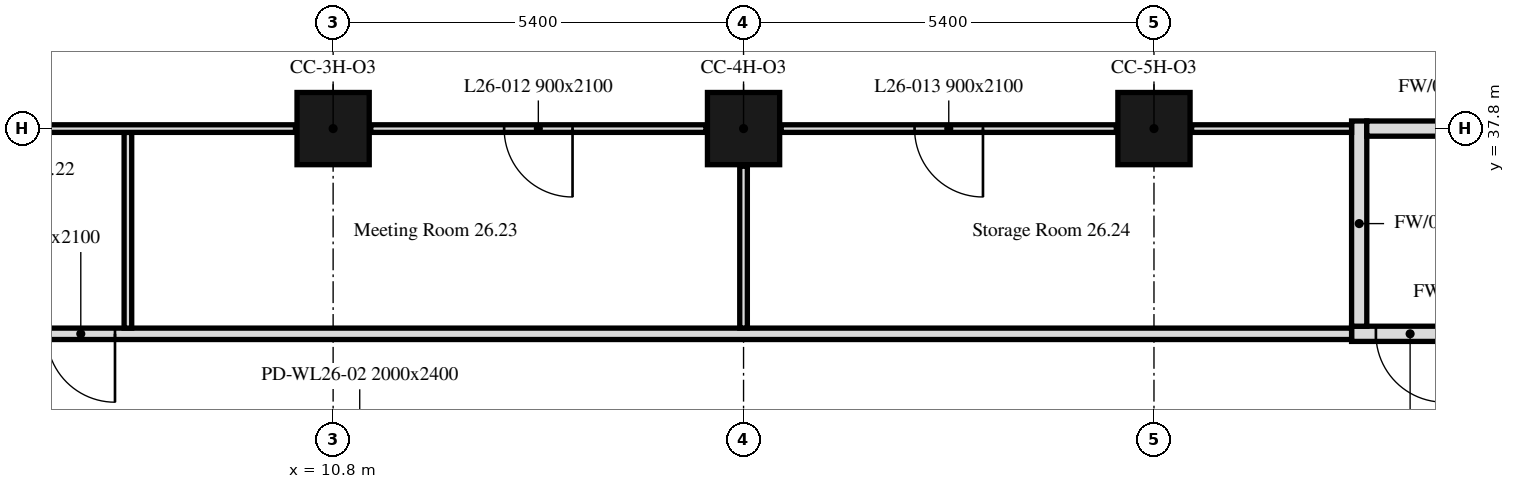
"""IFC4 building model, lengths in metres.
Left out: names, types, materials, properties, quantities, classifications, styles, units other than length and angle.
Written with IfcOpenShell. Run it as: python <this file> out.ifc"""

import sys

from ifc_helpers import new_model, si_unit, direction, frame, frame_2d, origin, origin_2d, place, context, subcontext, project, spatial, rectangle, extrude, element, fill, save


model = new_model("IFC4")
c1 = context("Model", 3, precision=1e-05, world=origin(), true_north=direction((0.0, 1.0)))
c2 = subcontext(c1, "Body", "Model", "MODEL_VIEW")
j1 = project(units=[si_unit("LENGTHUNIT", "METRE"), si_unit("PLANEANGLEUNIT", "RADIAN")], contexts=[c1])
p1 = place(None, origin())
s1 = spatial("IfcSite", under=j1, at=p1, CompositionType="ELEMENT")
p2 = place(p1, origin())
s2 = spatial("IfcBuilding", under=s1, at=p2, CompositionType="ELEMENT")
p3 = place(p2, frame((0.0, 0.0, 110.6)))
s3 = spatial("IfcBuildingStorey", under=s2, at=p3, CompositionType="ELEMENT", Elevation=110.6)
for number, where, z_axis, x_axis in (
    (1, (10.8, 37.8, 0.0), (0.0, 0.0, 1.0), (1.0, 0.0, 0.0)),
    (2, (16.2, 37.8, 0.0), (0.0, 0.0, 1.0), (1.0, 0.0, 0.0)),
    (3, (21.6, 37.8, 0.0), (0.0, 0.0, 1.0), (1.0, 0.0, 0.0)),
):
    element("IfcColumn", number, at=place(p3, frame(where, z_axis=z_axis, x_axis=x_axis)), inside=s3, PredefinedType="COLUMN", context=c2, shape_type="SweptSolid", body=[
        extrude(rectangle(XDim=0.95, YDim=0.95, at=origin_2d()), origin(), (0.0, 0.0, 1.0), 3.5),
    ])
p4 = place(p3, frame((27.1, 35.1, 0.0), z_axis=(0.0, 0.0, 1.0), x_axis=(-1.0, 0.0, 0.0)))
e4 = element("IfcWall", 4, at=p4, inside=s3, PredefinedType="PARTITIONING", context=c2, shape_type="SweptSolid", body=[
    extrude(rectangle(XDim=2.9, YDim=0.2, at=frame_2d((1.45, 0.0))), origin(), (0.0, 0.0, 1.0), 2.75),
])
p5 = place(p4, frame((1.68, 0.0, 0.0)))
e5 = element("IfcOpeningElement", 5, at=p5, cuts=e4, PredefinedType="OPENING", context=c2, shape_type="SweptSolid", body=[
    extrude(rectangle(XDim=0.9, YDim=2.1, at=frame_2d((0.45, 1.05))), frame((0.0, 0.1, 0.0), z_axis=(0.0, -1.0, 0.0), x_axis=(1.0, 0.0, 0.0)), (0.0, 0.0, 1.0), 0.2),
])
p6 = place(p3, frame((24.2, 35.1, 0.0), z_axis=(0.0, 0.0, 1.0), x_axis=(-1.0, 0.0, 0.0)))
e6 = element("IfcWall", 6, at=p6, inside=s3, PredefinedType="PARTITIONING", context=c2, shape_type="SweptSolid", body=[
    extrude(rectangle(XDim=23.449, YDim=0.15, at=frame_2d((11.725, 0.0))), origin(), (0.0, 0.0, 1.0), 2.75),
])
p7 = place(p6, frame((16.27, 0.0, 0.0)))
e7 = element("IfcOpeningElement", 7, at=p7, cuts=e6, PredefinedType="OPENING", context=c2, shape_type="SweptSolid", body=[
    extrude(rectangle(XDim=0.9, YDim=2.1, at=frame_2d((0.45, 1.05))), frame((0.0, 0.075, 0.0), z_axis=(0.0, -1.0, 0.0), x_axis=(1.0, 0.0, 0.0)), (0.0, 0.0, 1.0), 0.15),
])
p8 = place(p6, frame((20.375, 0.0, 0.0)))
e8 = element("IfcOpeningElement", 8, at=p8, cuts=e6, PredefinedType="OPENING", context=c2, shape_type="SweptSolid", body=[
    extrude(rectangle(XDim=0.9, YDim=2.1, at=frame_2d((0.45, 1.05))), frame((0.0, 0.075, 0.0), z_axis=(0.0, -1.0, 0.0), x_axis=(1.0, 0.0, 0.0)), (0.0, 0.0, 1.0), 0.15),
])
p9 = place(p3, frame((8.1, 35.175, 0.0), z_axis=(0.0, 0.0, 1.0), x_axis=(0.0, 1.0, 0.0)))
e9 = element("IfcWall", 9, at=p9, inside=s3, PredefinedType="PARTITIONING", context=c2, shape_type="SweptSolid", body=[
    extrude(rectangle(XDim=2.575, YDim=0.1, at=frame_2d((1.288, 0.0))), origin(), (0.0, 0.0, 1.0), 3.5),
])
p10 = place(p3, frame((16.2, 35.175, 0.0), z_axis=(0.0, 0.0, 1.0), x_axis=(0.0, 1.0, 0.0)))
e10 = element("IfcWall", 10, at=p10, inside=s3, PredefinedType="PARTITIONING", context=c2, shape_type="SweptSolid", body=[
    extrude(rectangle(XDim=2.13, YDim=0.1, at=frame_2d((1.065, 0.0))), origin(), (0.0, 0.0, 1.0), 2.75),
])
p11 = place(p3, frame((15.705, 37.8, 0.0), z_axis=(0.0, 0.0, 1.0), x_axis=(-1.0, 0.0, 0.0)))
e11 = element("IfcWall", 11, at=p11, inside=s3, PredefinedType="PARTITIONING", context=c2, shape_type="SweptSolid", body=[
    extrude(rectangle(XDim=4.41, YDim=0.1, at=frame_2d((2.205, 0.0))), origin(), (0.0, 0.0, 1.0), 2.75),
])
p12 = place(p11, frame((1.755, 0.0, 0.0)))
e12 = element("IfcOpeningElement", 12, at=p12, cuts=e11, PredefinedType="OPENING", context=c2, shape_type="SweptSolid", body=[
    extrude(rectangle(XDim=0.9, YDim=2.1, at=frame_2d((0.45, 1.05))), frame((0.0, 0.05, 0.0), z_axis=(0.0, -1.0, 0.0), x_axis=(1.0, 0.0, 0.0)), (0.0, 0.0, 1.0), 0.1),
])
p13 = place(p3, frame((10.305, 37.8, 0.0), z_axis=(0.0, 0.0, 1.0), x_axis=(-1.0, 0.0, 0.0)))
e13 = element("IfcWall", 13, at=p13, inside=s3, PredefinedType="PARTITIONING", context=c2, shape_type="SweptSolid", body=[
    extrude(rectangle(XDim=4.41, YDim=0.1, at=frame_2d((2.205, 0.0))), origin(), (0.0, 0.0, 1.0), 2.75),
])
p14 = place(p3, frame((24.3, 35.2, 0.0), z_axis=(0.0, 0.0, 1.0), x_axis=(0.0, 1.0, 0.0)))
e14 = element("IfcWall", 14, at=p14, inside=s3, PredefinedType="PARTITIONING", context=c2, shape_type="SweptSolid", body=[
    extrude(rectangle(XDim=2.7, YDim=0.2, at=frame_2d((1.35, 0.0))), origin(), (0.0, 0.0, 1.0), 3.5),
])
p15 = place(p3, frame((24.2, 37.8, 0.0), z_axis=(0.0, 0.0, 1.0), x_axis=(-1.0, 0.0, 0.0)))
e15 = element("IfcWall", 15, at=p15, inside=s3, PredefinedType="PARTITIONING", context=c2, shape_type="SweptSolid", body=[
    extrude(rectangle(XDim=2.105, YDim=0.1, at=frame_2d((1.052, 0.0))), origin(), (0.0, 0.0, 1.0), 3.5),
])
p16 = place(p3, frame((21.105, 37.8, 0.0), z_axis=(0.0, 0.0, 1.0), x_axis=(-1.0, 0.0, 0.0)))
e16 = element("IfcWall", 16, at=p16, inside=s3, PredefinedType="PARTITIONING", context=c2, shape_type="SweptSolid", body=[
    extrude(rectangle(XDim=4.41, YDim=0.1, at=frame_2d((2.205, 0.0))), origin(), (0.0, 0.0, 1.0), 3.5),
])
p17 = place(p16, frame((1.755, 0.0, 0.0)))
e17 = element("IfcOpeningElement", 17, at=p17, cuts=e16, PredefinedType="OPENING", context=c2, shape_type="SweptSolid", body=[
    extrude(rectangle(XDim=0.9, YDim=2.1, at=frame_2d((0.45, 1.05))), frame((0.0, 0.05, 0.0), z_axis=(0.0, -1.0, 0.0), x_axis=(1.0, 0.0, 0.0)), (0.0, 0.0, 1.0), 0.1),
])
p18 = place(p3, frame((26.505, 37.8, 0.0), z_axis=(0.0, 0.0, 1.0), x_axis=(-1.0, 0.0, 0.0)))
e18 = element("IfcWall", 18, at=p18, inside=s3, PredefinedType="PARTITIONING", context=c2, shape_type="SweptSolid", body=[
    extrude(rectangle(XDim=2.105, YDim=0.2, at=frame_2d((1.052, 0.0))), origin(), (0.0, 0.0, 1.0), 3.5),
])
p19 = place(p7, origin())
e19 = element("IfcDoor", 19, at=p19, inside=s3, OperationType="SINGLE_SWING_LEFT", PredefinedType="DOOR", context=c2, shape_type="SweptSolid", body=[
    extrude(rectangle(XDim=0.9, YDim=2.1, at=frame_2d((0.45, 1.05))), frame((0.0, 0.025, 0.0), z_axis=(0.0, -1.0, 0.0), x_axis=(1.0, 0.0, 0.0)), (0.0, 0.0, 1.0), 0.05),
])
fill(e7, e19)
p20 = place(p5, origin())
e20 = element("IfcDoor", 20, at=p20, inside=s3, OperationType="SINGLE_SWING_RIGHT", PredefinedType="DOOR", context=c2, shape_type="SweptSolid", body=[
    extrude(rectangle(XDim=0.9, YDim=2.1, at=frame_2d((0.45, 1.05))), frame((0.0, 0.025, 0.0), z_axis=(0.0, -1.0, 0.0), x_axis=(1.0, 0.0, 0.0)), (0.0, 0.0, 1.0), 0.05),
])
fill(e5, e20)
p21 = place(p12, origin())
e21 = element("IfcDoor", 21, at=p21, inside=s3, OperationType="SINGLE_SWING_LEFT", PredefinedType="DOOR", context=c2, shape_type="SweptSolid", body=[
    extrude(rectangle(XDim=0.9, YDim=2.1, at=frame_2d((0.45, 1.05))), frame((0.0, 0.025, 0.0), z_axis=(0.0, -1.0, 0.0), x_axis=(1.0, 0.0, 0.0)), (0.0, 0.0, 1.0), 0.05),
])
fill(e12, e21)
p22 = place(p17, origin())
e22 = element("IfcDoor", 22, at=p22, inside=s3, OperationType="SINGLE_SWING_RIGHT", PredefinedType="DOOR", context=c2, shape_type="SweptSolid", body=[
    extrude(rectangle(XDim=0.9, YDim=2.1, at=frame_2d((0.45, 1.05))), frame((0.0, 0.025, 0.0), z_axis=(0.0, -1.0, 0.0), x_axis=(1.0, 0.0, 0.0)), (0.0, 0.0, 1.0), 0.05),
])
fill(e17, e22)
save(model, sys.argv[1])
